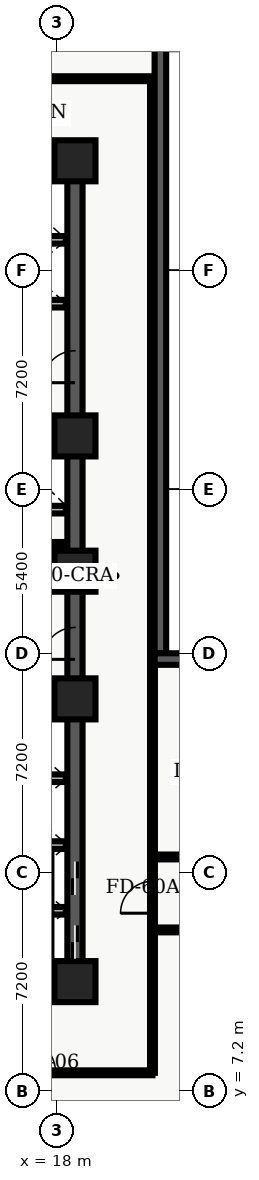
"""IFC4 building model, lengths in metres.
Left out: names, types, materials, properties, quantities, classifications, styles, units other than length and angle.
Written with IfcOpenShell. Run it as: python <this file> out.ifc"""

import sys

from ifc_helpers import new_model, entity, si_unit, converted_unit, direction, frame, origin_with_axes, origin_2d_with_axis, place, context, subcontext, project, spatial, polyline, rectangle, outline, extrude, element, fill, save


model = new_model("IFC4")
c1 = context("Model", 3, precision=1e-05, world=origin_with_axes(), true_north=direction((0.0, 1.0)))
c2 = subcontext(c1, "Body", "Model", "MODEL_VIEW")
j1 = project(units=[si_unit("LENGTHUNIT", "METRE"), converted_unit("PLANEANGLEUNIT", "DEGREE", entity("IfcPlaneAngleMeasure", 0.017), si_unit("PLANEANGLEUNIT", "RADIAN"), dimensions=[0, 0, 0, 0, 0, 0, 0])], contexts=[c1])
p1 = place(None, origin_with_axes())
s1 = spatial("IfcSite", under=j1, at=p1, CompositionType="ELEMENT")
p2 = place(p1, origin_with_axes())
s2 = spatial("IfcBuilding", under=s1, at=p2, CompositionType="ELEMENT")
p3 = place(p2, frame((0.0, 0.0, 84.6), z_axis=(0.0, 0.0, 1.0), x_axis=(1.0, 0.0, 0.0)))
s3 = spatial("IfcBuildingStorey", under=s2, at=p3, CompositionType="ELEMENT", Elevation=84.6)
p4 = place(p3, frame((11.4, 10.8, 0.0), z_axis=(0.0, 0.0, 1.0), x_axis=(1.0, 0.0, 0.0)))
e1 = element("IfcWall", 1, at=p4, inside=s3, PredefinedType="SHEAR", context=c2, shape_type="SweptSolid", body=[
    extrude(outline(polyline([(0.0, -0.25), (7.2, -0.25), (7.2, 0.25), (0.0, 0.25), (0.0, -0.25)])), origin_with_axes(), (0.0, 0.0, 1.0), 4.26),
])
p5 = place(p4, frame((2.625, 0.0, 0.0), z_axis=(0.0, 0.0, 1.0), x_axis=(1.0, 0.0, 0.0)))
e2 = element("IfcOpeningElement", 2, at=p5, cuts=e1, PredefinedType="OPENING", context=c2, shape_type="SweptSolid", body=[
    extrude(rectangle(XDim=1.05, YDim=0.52, at=origin_2d_with_axis()), origin_with_axes(), (0.0, 0.0, 1.0), 2.15),
])
p6 = place(p3, frame((11.4, 37.8, 0.0), z_axis=(0.0, 0.0, 1.0), x_axis=(1.0, 0.0, 0.0)))
e3 = element("IfcWall", 3, at=p6, inside=s3, PredefinedType="SHEAR", context=c2, shape_type="SweptSolid", body=[
    extrude(outline(polyline([(0.0, -0.25), (7.2, -0.25), (7.2, 0.25), (0.0, 0.25), (0.0, -0.25)])), origin_with_axes(), (0.0, 0.0, 1.0), 4.26),
])
p7 = place(p6, frame((2.625, 0.0, 0.0), z_axis=(0.0, 0.0, 1.0), x_axis=(1.0, 0.0, 0.0)))
e4 = element("IfcOpeningElement", 4, at=p7, cuts=e3, PredefinedType="OPENING", context=c2, shape_type="SweptSolid", body=[
    extrude(rectangle(XDim=1.05, YDim=0.52, at=origin_2d_with_axis()), origin_with_axes(), (0.0, 0.0, 1.0), 2.15),
])
p8 = place(p3, frame((18.6, 10.8, 0.0), z_axis=(0.0, 0.0, 1.0), x_axis=(0.0, 1.0, 0.0)))
e5 = element("IfcWall", 5, at=p8, inside=s3, PredefinedType="SHEAR", context=c2, shape_type="SweptSolid", body=[
    extrude(outline(polyline([(0.0, -0.25), (13.5, -0.25), (13.5, 0.25), (0.0, 0.25), (0.0, -0.25)])), origin_with_axes(), (0.0, 0.0, 1.0), 4.26),
])
p9 = place(p8, frame((1.3, 0.0, 0.0), z_axis=(0.0, 0.0, 1.0), x_axis=(1.0, 0.0, 0.0)))
e6 = element("IfcOpeningElement", 6, at=p9, cuts=e5, PredefinedType="OPENING", context=c2, shape_type="SweptSolid", body=[
    extrude(rectangle(XDim=1.1, YDim=0.52, at=origin_2d_with_axis()), origin_with_axes(), (0.0, 0.0, 1.0), 2.15),
])
p10 = place(p8, frame((3.4, 0.0, 0.0), z_axis=(0.0, 0.0, 1.0), x_axis=(1.0, 0.0, 0.0)))
e7 = element("IfcOpeningElement", 7, at=p10, cuts=e5, PredefinedType="OPENING", context=c2, shape_type="SweptSolid", body=[
    extrude(rectangle(XDim=1.1, YDim=0.52, at=origin_2d_with_axis()), origin_with_axes(), (0.0, 0.0, 1.0), 2.15),
])
p11 = place(p8, frame((11.125, 0.0, 0.0), z_axis=(0.0, 0.0, 1.0), x_axis=(1.0, 0.0, 0.0)))
e8 = element("IfcOpeningElement", 8, at=p11, cuts=e5, PredefinedType="OPENING", context=c2, shape_type="SweptSolid", body=[
    extrude(rectangle(XDim=1.05, YDim=0.52, at=origin_2d_with_axis()), origin_with_axes(), (0.0, 0.0, 1.0), 2.15),
])
p12 = place(p3, frame((18.6, 24.3, 0.0), z_axis=(0.0, 0.0, 1.0), x_axis=(0.0, 1.0, 0.0)))
e9 = element("IfcWall", 9, at=p12, inside=s3, PredefinedType="SHEAR", context=c2, shape_type="SweptSolid", body=[
    extrude(outline(polyline([(0.0, -0.25), (13.5, -0.25), (13.5, 0.25), (0.0, 0.25), (0.0, -0.25)])), origin_with_axes(), (0.0, 0.0, 1.0), 4.26),
])
p13 = place(p12, frame((6.725, 0.0, 0.0), z_axis=(0.0, 0.0, 1.0), x_axis=(1.0, 0.0, 0.0)))
e10 = element("IfcOpeningElement", 10, at=p13, cuts=e9, PredefinedType="OPENING", context=c2, shape_type="SweptSolid", body=[
    extrude(rectangle(XDim=1.05, YDim=0.52, at=origin_2d_with_axis()), origin_with_axes(), (0.0, 0.0, 1.0), 2.15),
])
for number, where, z_axis, x_axis in (
    (11, (11.65, 19.825, 0.0), (0.0, 0.0, 1.0), (1.0, 0.0, 0.0)),
    (12, (11.65, 28.775, 0.0), (0.0, 0.0, 1.0), (1.0, 0.0, 0.0)),
):
    element("IfcWall", number, at=place(p3, frame(where, z_axis=z_axis, x_axis=x_axis)), inside=s3, PredefinedType="SHEAR", context=c2, shape_type="SweptSolid", body=[
        extrude(outline(polyline([(0.0, -0.125), (6.7, -0.125), (6.7, 0.125), (0.0, 0.125), (0.0, -0.125)])), origin_with_axes(), (0.0, 0.0, 1.0), 4.26),
    ])
p14 = place(p3, frame((11.7, 24.1, 0.0), z_axis=(0.0, 0.0, 1.0), x_axis=(1.0, 0.0, 0.0)))
e13 = element("IfcWall", 13, at=p14, inside=s3, PredefinedType="SOLIDWALL", context=c2, shape_type="SweptSolid", body=[
    extrude(outline(polyline([(0.0, -0.125), (6.6, -0.125), (6.6, 0.125), (0.0, 0.125), (0.0, -0.125)])), origin_with_axes(), (0.0, 0.0, 1.0), 3.3),
])
p15 = place(p14, frame((3.75, 0.0, 0.0), z_axis=(0.0, 0.0, 1.0), x_axis=(1.0, 0.0, 0.0)))
e14 = element("IfcOpeningElement", 14, at=p15, cuts=e13, PredefinedType="OPENING", context=c2, shape_type="SweptSolid", body=[
    extrude(rectangle(XDim=0.9, YDim=0.27, at=origin_2d_with_axis()), origin_with_axes(), (0.0, 0.0, 1.0), 2.15),
])
p16 = place(p3, frame((11.7, 26.325, 0.0), z_axis=(0.0, 0.0, 1.0), x_axis=(1.0, 0.0, 0.0)))
e15 = element("IfcWall", 15, at=p16, inside=s3, PredefinedType="SOLIDWALL", context=c2, shape_type="SweptSolid", body=[
    extrude(outline(polyline([(0.0, -0.125), (6.6, -0.125), (6.6, 0.125), (0.0, 0.125), (0.0, -0.125)])), origin_with_axes(), (0.0, 0.0, 1.0), 3.3),
])
p17 = place(p16, frame((3.5, 0.0, 0.0), z_axis=(0.0, 0.0, 1.0), x_axis=(1.0, 0.0, 0.0)))
e16 = element("IfcOpeningElement", 16, at=p17, cuts=e15, PredefinedType="OPENING", context=c2, shape_type="SweptSolid", body=[
    extrude(rectangle(XDim=0.9, YDim=0.27, at=origin_2d_with_axis()), origin_with_axes(), (0.0, 0.0, 1.0), 2.15),
])
for number, where, z_axis, x_axis in (
    (17, (18.6, 10.8, 0.0), (0.0, 0.0, 1.0), (1.0, 0.0, 0.0)),
    (18, (18.6, 20.1, 0.0), (0.0, 0.0, 1.0), (1.0, 0.0, 0.0)),
    (19, (18.6, 24.3, 0.0), (0.0, 0.0, 1.0), (1.0, 0.0, 0.0)),
    (20, (18.6, 28.75, 0.0), (0.0, 0.0, 1.0), (1.0, 0.0, 0.0)),
    (21, (18.6, 37.8, 0.0), (0.0, 0.0, 1.0), (1.0, 0.0, 0.0)),
):
    element("IfcColumn", number, at=place(p3, frame(where, z_axis=z_axis, x_axis=x_axis)), inside=s3, PredefinedType="COLUMN", context=c2, shape_type="SweptSolid", body=[
        extrude(rectangle(XDim=1.35, YDim=1.35, at=origin_2d_with_axis()), origin_with_axes(), (0.0, 0.0, 1.0), 4.5),
    ])
p18 = place(p3, frame((14.62, 25.18, 0.0), z_axis=(0.0, 0.0, 1.0), x_axis=(1.0, 0.0, 0.0)))
e22 = element("IfcWall", 22, at=p18, inside=s3, PredefinedType="PARTITIONING", context=c2, shape_type="SweptSolid", body=[
    extrude(outline(polyline([(0.0, -0.08), (3.68, -0.08), (3.68, 0.08), (0.0, 0.08), (0.0, -0.08)])), origin_with_axes(), (0.0, 0.0, 1.0), 3.2),
])
p19 = place(p18, frame((1.95, 0.0, 0.0), z_axis=(0.0, 0.0, 1.0), x_axis=(1.0, 0.0, 0.0)))
e23 = element("IfcOpeningElement", 23, at=p19, cuts=e22, PredefinedType="OPENING", context=c2, shape_type="SweptSolid", body=[
    extrude(rectangle(XDim=0.9, YDim=0.18, at=origin_2d_with_axis()), origin_with_axes(), (0.0, 0.0, 1.0), 2.15),
])
for number, where, z_axis, x_axis in (
    (24, (15.84, 13.13, 0.0), (0.0, 0.0, 1.0), (1.0, 0.0, 0.0)),
    (25, (15.84, 15.29, 0.0), (0.0, 0.0, 1.0), (1.0, 0.0, 0.0)),
    (26, (15.84, 17.49, 0.0), (0.0, 0.0, 1.0), (1.0, 0.0, 0.0)),
    (27, (15.84, 33.1, 0.0), (0.0, 0.0, 1.0), (1.0, 0.0, 0.0)),
    (28, (15.84, 35.2, 0.0), (0.0, 0.0, 1.0), (1.0, 0.0, 0.0)),
):
    element("IfcWall", number, at=place(p3, frame(where, z_axis=z_axis, x_axis=x_axis)), inside=s3, PredefinedType="SOLIDWALL", context=c2, shape_type="SweptSolid", body=[
        extrude(outline(polyline([(0.0, -0.125), (2.46, -0.125), (2.46, 0.125), (0.0, 0.125), (0.0, -0.125)])), origin_with_axes(), (0.0, 0.0, 1.0), 3.2),
    ])
p20 = place(p3, frame((2.6, 7.8, 0.0), z_axis=(0.0, 0.0, 1.0), x_axis=(1.0, 0.0, 0.0)))
e29 = element("IfcWall", 29, at=p20, inside=s3, PredefinedType="PARTITIONING", context=c2, shape_type="SweptSolid", body=[
    extrude(outline(polyline([(0.0, -0.08), (18.55, -0.08), (18.55, 0.08), (0.0, 0.08), (0.0, -0.08)])), origin_with_axes(), (0.0, 0.0, 1.0), 3.2),
])
p21 = place(p20, frame((2.501, 0.0, 0.0), z_axis=(0.0, 0.0, 1.0), x_axis=(1.0, 0.0, 0.0)))
e30 = element("IfcOpeningElement", 30, at=p21, cuts=e29, PredefinedType="OPENING", context=c2, shape_type="SweptSolid", body=[
    extrude(rectangle(XDim=1.0, YDim=0.18, at=origin_2d_with_axis()), origin_with_axes(), (0.0, 0.0, 1.0), 2.15),
])
p22 = place(p20, frame((8.018, 0.0, 0.0), z_axis=(0.0, 0.0, 1.0), x_axis=(1.0, 0.0, 0.0)))
e31 = element("IfcOpeningElement", 31, at=p22, cuts=e29, PredefinedType="OPENING", context=c2, shape_type="SweptSolid", body=[
    extrude(rectangle(XDim=1.0, YDim=0.18, at=origin_2d_with_axis()), origin_with_axes(), (0.0, 0.0, 1.0), 2.15),
])
p23 = place(p20, frame((14.762, 0.0, 0.0), z_axis=(0.0, 0.0, 1.0), x_axis=(1.0, 0.0, 0.0)))
e32 = element("IfcOpeningElement", 32, at=p23, cuts=e29, PredefinedType="OPENING", context=c2, shape_type="SweptSolid", body=[
    extrude(rectangle(XDim=1.2, YDim=0.18, at=origin_2d_with_axis()), origin_with_axes(), (0.0, 0.0, 1.0), 2.2),
])
p24 = place(p3, frame((2.6, 40.5, 0.0), z_axis=(0.0, 0.0, 1.0), x_axis=(1.0, 0.0, 0.0)))
e33 = element("IfcWall", 33, at=p24, inside=s3, PredefinedType="PARTITIONING", context=c2, shape_type="SweptSolid", body=[
    extrude(outline(polyline([(0.0, -0.08), (18.65, -0.08), (18.65, 0.08), (0.0, 0.08), (0.0, -0.08)])), origin_with_axes(), (0.0, 0.0, 1.0), 3.2),
])
p25 = place(p24, frame((2.291, 0.0, 0.0), z_axis=(0.0, 0.0, 1.0), x_axis=(1.0, 0.0, 0.0)))
e34 = element("IfcOpeningElement", 34, at=p25, cuts=e33, PredefinedType="OPENING", context=c2, shape_type="SweptSolid", body=[
    extrude(rectangle(XDim=1.0, YDim=0.18, at=origin_2d_with_axis()), origin_with_axes(), (0.0, 0.0, 1.0), 2.15),
])
p26 = place(p24, frame((7.59, 0.0, 0.0), z_axis=(0.0, 0.0, 1.0), x_axis=(1.0, 0.0, 0.0)))
e35 = element("IfcOpeningElement", 35, at=p26, cuts=e33, PredefinedType="OPENING", context=c2, shape_type="SweptSolid", body=[
    extrude(rectangle(XDim=1.0, YDim=0.18, at=origin_2d_with_axis()), origin_with_axes(), (0.0, 0.0, 1.0), 2.15),
])
p27 = place(p24, frame((13.223, 0.0, 0.0), z_axis=(0.0, 0.0, 1.0), x_axis=(1.0, 0.0, 0.0)))
e36 = element("IfcOpeningElement", 36, at=p27, cuts=e33, PredefinedType="OPENING", context=c2, shape_type="SweptSolid", body=[
    extrude(rectangle(XDim=1.2, YDim=0.18, at=origin_2d_with_axis()), origin_with_axes(), (0.0, 0.0, 1.0), 2.2),
])
p28 = place(p3, frame((21.15, 7.8, 0.0), z_axis=(0.0, 0.0, 1.0), x_axis=(0.0, 1.0, 0.0)))
e37 = element("IfcWall", 37, at=p28, inside=s3, PredefinedType="PARTITIONING", context=c2, shape_type="SweptSolid", body=[
    extrude(outline(polyline([(0.0, -0.08), (32.7, -0.08), (32.7, 0.08), (0.0, 0.08), (0.0, -0.08)])), origin_with_axes(), (0.0, 0.0, 1.0), 3.2),
])
p29 = place(p28, frame((5.775, 0.0, 0.0), z_axis=(0.0, 0.0, 1.0), x_axis=(1.0, 0.0, 0.0)))
e38 = element("IfcOpeningElement", 38, at=p29, cuts=e37, PredefinedType="OPENING", context=c2, shape_type="SweptSolid", body=[
    extrude(rectangle(XDim=1.05, YDim=0.18, at=origin_2d_with_axis()), origin_with_axes(), (0.0, 0.0, 1.0), 2.15),
])
p30 = place(p3, frame((21.15, 12.5, 0.0), z_axis=(0.0, 0.0, 1.0), x_axis=(1.0, 0.0, 0.0)))
e39 = element("IfcWall", 39, at=p30, inside=s3, PredefinedType="PARTITIONING", context=c2, shape_type="SweptSolid", body=[
    extrude(outline(polyline([(0.0, -0.08), (15.2, -0.08), (15.2, 0.08), (0.0, 0.08), (0.0, -0.08)])), origin_with_axes(), (0.0, 0.0, 1.0), 3.2),
])
p31 = place(p30, frame((3.491, 0.0, 0.0), z_axis=(0.0, 0.0, 1.0), x_axis=(1.0, 0.0, 0.0)))
e40 = element("IfcOpeningElement", 40, at=p31, cuts=e39, PredefinedType="OPENING", context=c2, shape_type="SweptSolid", body=[
    extrude(rectangle(XDim=1.0, YDim=0.18, at=origin_2d_with_axis()), origin_with_axes(), (0.0, 0.0, 1.0), 2.15),
])
p32 = place(p30, frame((10.961, 0.0, 0.0), z_axis=(0.0, 0.0, 1.0), x_axis=(1.0, 0.0, 0.0)))
e41 = element("IfcOpeningElement", 41, at=p32, cuts=e39, PredefinedType="OPENING", context=c2, shape_type="SweptSolid", body=[
    extrude(rectangle(XDim=1.0, YDim=0.18, at=origin_2d_with_axis()), origin_with_axes(), (0.0, 0.0, 1.0), 2.15),
])
p33 = place(p3, frame((21.15, 14.9, 0.0), z_axis=(0.0, 0.0, 1.0), x_axis=(1.0, 0.0, 0.0)))
e42 = element("IfcWall", 42, at=p33, inside=s3, PredefinedType="PARTITIONING", context=c2, shape_type="SweptSolid", body=[
    extrude(outline(polyline([(0.0, -0.08), (15.2, -0.08), (15.2, 0.08), (0.0, 0.08), (0.0, -0.08)])), origin_with_axes(), (0.0, 0.0, 1.0), 3.2),
])
p34 = place(p33, frame((3.515, 0.0, 0.0), z_axis=(0.0, 0.0, 1.0), x_axis=(1.0, 0.0, 0.0)))
e43 = element("IfcOpeningElement", 43, at=p34, cuts=e42, PredefinedType="OPENING", context=c2, shape_type="SweptSolid", body=[
    extrude(rectangle(XDim=1.0, YDim=0.18, at=origin_2d_with_axis()), origin_with_axes(), (0.0, 0.0, 1.0), 2.15),
])
p35 = place(p33, frame((10.986, 0.0, 0.0), z_axis=(0.0, 0.0, 1.0), x_axis=(1.0, 0.0, 0.0)))
e44 = element("IfcOpeningElement", 44, at=p35, cuts=e42, PredefinedType="OPENING", context=c2, shape_type="SweptSolid", body=[
    extrude(rectangle(XDim=1.0, YDim=0.18, at=origin_2d_with_axis()), origin_with_axes(), (0.0, 0.0, 1.0), 2.15),
])
p36 = place(p3, frame((21.41, 45.82, 0.0), z_axis=(0.0, 0.0, 1.0), x_axis=(0.0, -1.0, 0.0)))
e45 = element("IfcWall", 45, at=p36, inside=s3, PredefinedType="SOLIDWALL", context=c2, shape_type="SweptSolid", body=[
    extrude(outline(polyline([(0.0, -0.19), (24.22, -0.19), (24.22, 0.19), (0.0, 0.19), (0.0, -0.19)])), origin_with_axes(), (0.0, 0.0, 1.0), 4.26),
])
p37 = place(p36, frame((2.902, 0.0, 0.45), z_axis=(0.0, 0.0, 1.0), x_axis=(1.0, 0.0, 0.0)))
e46 = element("IfcOpeningElement", 46, at=p37, cuts=e45, PredefinedType="OPENING", context=c2, shape_type="SweptSolid", body=[
    extrude(rectangle(XDim=2.1, YDim=0.4, at=origin_2d_with_axis()), origin_with_axes(), (0.0, 0.0, 1.0), 2.2),
])
p38 = place(p3, frame((21.22, 21.41, 0.0), z_axis=(0.0, 0.0, 1.0), x_axis=(1.0, 0.0, 0.0)))
e47 = element("IfcWall", 47, at=p38, inside=s3, PredefinedType="SOLIDWALL", context=c2, shape_type="SweptSolid", body=[
    extrude(outline(polyline([(0.0, -0.19), (17.18, -0.19), (17.18, 0.19), (0.0, 0.19), (0.0, -0.19)])), origin_with_axes(), (0.0, 0.0, 1.0), 4.26),
])
p39 = place(p38, frame((3.263, 0.0, 0.45), z_axis=(0.0, 0.0, 1.0), x_axis=(1.0, 0.0, 0.0)))
e48 = element("IfcOpeningElement", 48, at=p39, cuts=e47, PredefinedType="OPENING", context=c2, shape_type="SweptSolid", body=[
    extrude(rectangle(XDim=2.1, YDim=0.4, at=origin_2d_with_axis()), origin_with_axes(), (0.0, 0.0, 1.0), 2.2),
])
p40 = place(p38, frame((8.59, 0.0, 0.45), z_axis=(0.0, 0.0, 1.0), x_axis=(1.0, 0.0, 0.0)))
e49 = element("IfcOpeningElement", 49, at=p40, cuts=e47, PredefinedType="OPENING", context=c2, shape_type="SweptSolid", body=[
    extrude(rectangle(XDim=2.1, YDim=0.4, at=origin_2d_with_axis()), origin_with_axes(), (0.0, 0.0, 1.0), 2.2),
])
p41 = place(p38, frame((13.467, 0.0, 0.45), z_axis=(0.0, 0.0, 1.0), x_axis=(1.0, 0.0, 0.0)))
e50 = element("IfcOpeningElement", 50, at=p41, cuts=e47, PredefinedType="OPENING", context=c2, shape_type="SweptSolid", body=[
    extrude(rectangle(XDim=2.1, YDim=0.4, at=origin_2d_with_axis()), origin_with_axes(), (0.0, 0.0, 1.0), 2.2),
])
p42 = place(p8, frame((1.3, 0.0, 0.0), z_axis=(0.0, 0.0, 1.0), x_axis=(1.0, 0.0, 0.0)))
e51 = element("IfcDoor", 51, at=p42, inside=s3, OperationType="SLIDING_TO_LEFT", PredefinedType="DOOR", context=c2, shape_type="SweptSolid", body=[
    extrude(rectangle(XDim=1.1, YDim=0.09, at=origin_2d_with_axis()), origin_with_axes(), (0.0, 0.0, 1.0), 2.15),
])
fill(e6, e51)
p43 = place(p8, frame((3.4, 0.0, 0.0), z_axis=(0.0, 0.0, 1.0), x_axis=(1.0, 0.0, 0.0)))
e52 = element("IfcDoor", 52, at=p43, inside=s3, OperationType="SLIDING_TO_RIGHT", PredefinedType="DOOR", context=c2, shape_type="SweptSolid", body=[
    extrude(rectangle(XDim=1.1, YDim=0.09, at=origin_2d_with_axis()), origin_with_axes(), (0.0, 0.0, 1.0), 2.15),
])
fill(e7, e52)
p44 = place(p8, frame((11.125, 0.0, 0.0), z_axis=(0.0, 0.0, 1.0), x_axis=(1.0, 0.0, 0.0)))
e53 = element("IfcDoor", 53, at=p44, inside=s3, OperationType="SINGLE_SWING_LEFT", PredefinedType="DOOR", context=c2, shape_type="SweptSolid", body=[
    extrude(rectangle(XDim=1.05, YDim=0.09, at=origin_2d_with_axis()), origin_with_axes(), (0.0, 0.0, 1.0), 2.15),
])
fill(e8, e53)
p45 = place(p12, frame((6.725, 0.0, 0.0), z_axis=(0.0, 0.0, 1.0), x_axis=(1.0, 0.0, 0.0)))
e54 = element("IfcDoor", 54, at=p45, inside=s3, OperationType="SINGLE_SWING_LEFT", PredefinedType="DOOR", context=c2, shape_type="SweptSolid", body=[
    extrude(rectangle(XDim=1.05, YDim=0.09, at=origin_2d_with_axis()), origin_with_axes(), (0.0, 0.0, 1.0), 2.15),
])
fill(e10, e54)
p46 = place(p20, frame((14.762, 0.0, 0.0), z_axis=(0.0, 0.0, 1.0), x_axis=(1.0, 0.0, 0.0)))
e55 = element("IfcDoor", 55, at=p46, inside=s3, OperationType="SINGLE_SWING_LEFT", PredefinedType="DOOR", context=c2, shape_type="SweptSolid", body=[
    extrude(rectangle(XDim=1.2, YDim=0.09, at=origin_2d_with_axis()), origin_with_axes(), (0.0, 0.0, 1.0), 2.2),
])
fill(e32, e55)
p47 = place(p28, frame((5.775, 0.0, 0.0), z_axis=(0.0, 0.0, 1.0), x_axis=(1.0, 0.0, 0.0)))
e56 = element("IfcDoor", 56, at=p47, inside=s3, OperationType="SINGLE_SWING_LEFT", PredefinedType="DOOR", context=c2, shape_type="SweptSolid", body=[
    extrude(rectangle(XDim=1.05, YDim=0.09, at=origin_2d_with_axis()), origin_with_axes(), (0.0, 0.0, 1.0), 2.15),
])
fill(e38, e56)
save(model, sys.argv[1])
